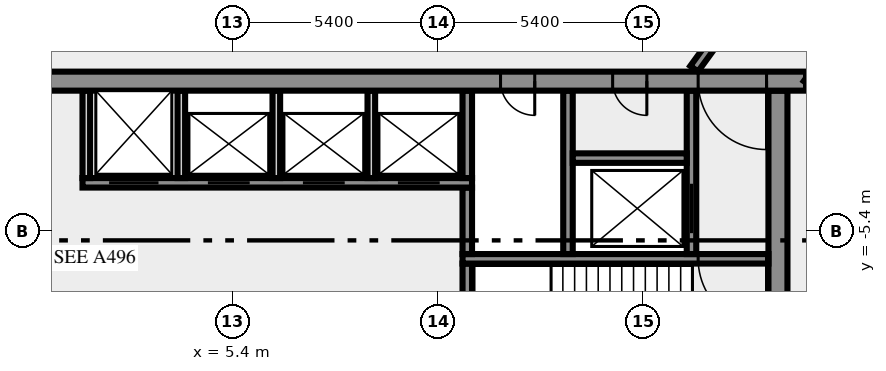
"""IFC4 building model, lengths in metres.
Left out: names, types, materials, properties, quantities, classifications, styles, units other than length and angle.
Written with IfcOpenShell. Run it as: python <this file> out.ifc"""

import sys

from ifc_helpers import new_model, si_unit, direction, frame, frame_2d, origin, place, context, subcontext, project, spatial, rectangle, extrude, element, fill, save


model = new_model("IFC4")
c1 = context("Model", 3, precision=1e-05, world=origin(), true_north=direction((0.0, 1.0)))
c2 = subcontext(c1, "Body", "Model", "MODEL_VIEW")
j1 = project(units=[si_unit("LENGTHUNIT", "METRE"), si_unit("PLANEANGLEUNIT", "RADIAN")], contexts=[c1])
p1 = place(None, origin())
s1 = spatial("IfcSite", under=j1, at=p1, CompositionType="ELEMENT")
p2 = place(p1, origin())
s2 = spatial("IfcBuilding", under=s1, at=p2, CompositionType="ELEMENT")
p3 = place(p2, frame((0.0, 0.0, 218.0)))
s3 = spatial("IfcBuildingStorey", under=s2, at=p3, CompositionType="ELEMENT", Elevation=218.0)
p4 = place(p3, frame((19.75, -10.5, 0.0), z_axis=(0.0, 0.0, 1.0), x_axis=(0.0, 1.0, 0.0)))
e1 = element("IfcWall", 1, at=p4, inside=s3, PredefinedType="SHEAR", context=c2, shape_type="SweptSolid", body=[
    extrude(rectangle(XDim=8.8, YDim=0.5, at=frame_2d((4.4, 0.0))), origin(), (0.0, 0.0, 1.0), 3.65),
])
p5 = place(p3, frame((11.575, -7.25, 0.0), z_axis=(0.0, 0.0, 1.0), x_axis=(0.0, 1.0, 0.0)))
e2 = element("IfcWall", 2, at=p5, inside=s3, PredefinedType="SHEAR", context=c2, shape_type="SweptSolid", body=[
    extrude(rectangle(XDim=1.0, YDim=0.25, at=frame_2d((0.5, 0.0))), origin(), (0.0, 0.0, 1.0), 3.65),
])
p6 = place(p3, frame((19.5, -6.125, 0.0), z_axis=(0.0, 0.0, 1.0), x_axis=(-1.0, 0.0, 0.0)))
e3 = element("IfcWall", 3, at=p6, inside=s3, PredefinedType="SHEAR", context=c2, shape_type="SweptSolid", body=[
    extrude(rectangle(XDim=8.05, YDim=0.25, at=frame_2d((4.025, 0.0))), origin(), (0.0, 0.0, 1.0), 3.65),
])
p7 = place(p6, frame((0.05, 0.0, 0.0)))
e4 = element("IfcOpeningElement", 4, at=p7, cuts=e3, PredefinedType="OPENING", context=c2, shape_type="SweptSolid", body=[
    extrude(rectangle(XDim=1.8, YDim=2.1, at=frame_2d((0.9, 1.05))), frame((0.0, 0.135, 0.0), z_axis=(0.0, -1.0, 0.0), x_axis=(1.0, 0.0, 0.0)), (0.0, 0.0, 1.0), 0.27),
])
p8 = place(p3, frame((11.575, -6.0, 0.0), z_axis=(0.0, 0.0, 1.0), x_axis=(0.0, 1.0, 0.0)))
e5 = element("IfcWall", 5, at=p8, inside=s3, PredefinedType="SHEAR", context=c2, shape_type="SweptSolid", body=[
    extrude(rectangle(XDim=1.75, YDim=0.25, at=frame_2d((0.875, 0.0))), origin(), (0.0, 0.0, 1.0), 3.65),
])
p9 = place(p3, frame((14.225, -6.0, 0.0), z_axis=(0.0, 0.0, 1.0), x_axis=(0.0, 1.0, 0.0)))
e6 = element("IfcWall", 6, at=p9, inside=s3, PredefinedType="SHEAR", context=c2, shape_type="SweptSolid", body=[
    extrude(rectangle(XDim=4.3, YDim=0.25, at=frame_2d((2.15, 0.0))), origin(), (0.0, 0.0, 1.0), 3.65),
])
p10 = place(p3, frame((17.475, -6.0, 0.0), z_axis=(0.0, 0.0, 1.0), x_axis=(0.0, 1.0, 0.0)))
e7 = element("IfcWall", 7, at=p10, inside=s3, PredefinedType="SHEAR", context=c2, shape_type="SweptSolid", body=[
    extrude(rectangle(XDim=4.3, YDim=0.25, at=frame_2d((2.15, 0.0))), origin(), (0.0, 0.0, 1.0), 3.65),
])
p11 = place(p10, frame((0.55, 0.0, 0.0)))
e8 = element("IfcOpeningElement", 8, at=p11, cuts=e7, PredefinedType="OPENING", context=c2, shape_type="SweptSolid", body=[
    extrude(rectangle(XDim=1.3, YDim=2.1, at=frame_2d((0.65, 1.05))), frame((0.0, 0.135, 0.0), z_axis=(0.0, -1.0, 0.0), x_axis=(1.0, 0.0, 0.0)), (0.0, 0.0, 1.0), 0.27),
])
p12 = place(p3, frame((1.45, -4.125, 0.0), z_axis=(0.0, 0.0, 1.0), x_axis=(1.0, 0.0, 0.0)))
e9 = element("IfcWall", 9, at=p12, inside=s3, PredefinedType="SHEAR", context=c2, shape_type="SweptSolid", body=[
    extrude(rectangle(XDim=10.25, YDim=0.25, at=frame_2d((5.125, 0.0))), origin(), (0.0, 0.0, 1.0), 3.65),
])
p13 = place(p12, frame((0.7, 0.0, 0.0)))
e10 = element("IfcOpeningElement", 10, at=p13, cuts=e9, PredefinedType="OPENING", context=c2, shape_type="SweptSolid", body=[
    extrude(rectangle(XDim=1.3, YDim=2.1, at=frame_2d((0.65, 1.05))), frame((0.0, 0.135, 0.0), z_axis=(0.0, -1.0, 0.0), x_axis=(1.0, 0.0, 0.0)), (0.0, 0.0, 1.0), 0.27),
])
p14 = place(p12, frame((3.3, 0.0, 0.0)))
e11 = element("IfcOpeningElement", 11, at=p14, cuts=e9, PredefinedType="OPENING", context=c2, shape_type="SweptSolid", body=[
    extrude(rectangle(XDim=1.1, YDim=2.1, at=frame_2d((0.55, 1.05))), frame((0.0, 0.135, 0.0), z_axis=(0.0, -1.0, 0.0), x_axis=(1.0, 0.0, 0.0)), (0.0, 0.0, 1.0), 0.27),
])
p15 = place(p12, frame((5.8, 0.0, 0.0)))
e12 = element("IfcOpeningElement", 12, at=p15, cuts=e9, PredefinedType="OPENING", context=c2, shape_type="SweptSolid", body=[
    extrude(rectangle(XDim=1.1, YDim=2.1, at=frame_2d((0.55, 1.05))), frame((0.0, 0.135, 0.0), z_axis=(0.0, -1.0, 0.0), x_axis=(1.0, 0.0, 0.0)), (0.0, 0.0, 1.0), 0.27),
])
p16 = place(p12, frame((8.3, 0.0, 0.0)))
e13 = element("IfcOpeningElement", 13, at=p16, cuts=e9, PredefinedType="OPENING", context=c2, shape_type="SweptSolid", body=[
    extrude(rectangle(XDim=1.1, YDim=2.1, at=frame_2d((0.55, 1.05))), frame((0.0, 0.135, 0.0), z_axis=(0.0, -1.0, 0.0), x_axis=(1.0, 0.0, 0.0)), (0.0, 0.0, 1.0), 0.27),
])
for number, where, z_axis, x_axis in (
    (14, (1.55, -4.0, 0.0), (0.0, 0.0, 1.0), (0.0, 1.0, 0.0)),
    (15, (4.05, -4.0, 0.0), (0.0, 0.0, 1.0), (0.0, 1.0, 0.0)),
    (16, (6.55, -4.0, 0.0), (0.0, 0.0, 1.0), (0.0, 1.0, 0.0)),
    (17, (9.05, -4.0, 0.0), (0.0, 0.0, 1.0), (0.0, 1.0, 0.0)),
):
    element("IfcWall", number, at=place(p3, frame(where, z_axis=z_axis, x_axis=x_axis)), inside=s3, PredefinedType="SOLIDWALL", context=c2, shape_type="SweptSolid", body=[
        extrude(rectangle(XDim=2.3, YDim=0.2, at=frame_2d((1.15, 0.0))), origin(), (0.0, 0.0, 1.0), 3.65),
    ])
p17 = place(p3, frame((11.575, -4.0, 0.0), z_axis=(0.0, 0.0, 1.0), x_axis=(0.0, 1.0, 0.0)))
e18 = element("IfcWall", 18, at=p17, inside=s3, PredefinedType="SHEAR", context=c2, shape_type="SweptSolid", body=[
    extrude(rectangle(XDim=2.3, YDim=0.25, at=frame_2d((1.15, 0.0))), origin(), (0.0, 0.0, 1.0), 3.65),
])
p18 = place(p3, frame((14.35, -3.475, 0.0), z_axis=(0.0, 0.0, 1.0), x_axis=(1.0, 0.0, 0.0)))
e19 = element("IfcWall", 19, at=p18, inside=s3, PredefinedType="SHEAR", context=c2, shape_type="SweptSolid", body=[
    extrude(rectangle(XDim=3.0, YDim=0.25, at=frame_2d((1.5, 0.0))), origin(), (0.0, 0.0, 1.0), 3.65),
])
p19 = place(p3, frame((20.49, -1.45, 0.0), z_axis=(0.0, 0.0, 1.0), x_axis=(-1.0, 0.0, 0.0)))
e20 = element("IfcWall", 20, at=p19, inside=s3, PredefinedType="SHEAR", context=c2, shape_type="SweptSolid", body=[
    extrude(rectangle(XDim=40.98, YDim=0.5, at=frame_2d((20.49, 0.0))), origin(), (0.0, 0.0, 1.0), 3.65),
])
p20 = place(p19, frame((38.14, 0.0, 0.0)))
e21 = element("IfcOpeningElement", 21, at=p20, cuts=e20, PredefinedType="OPENING", context=c2, shape_type="SweptSolid", body=[
    extrude(rectangle(XDim=1.8, YDim=2.1, at=frame_2d((0.9, 1.05))), frame((0.0, 0.26, 0.0), z_axis=(0.0, -1.0, 0.0), x_axis=(1.0, 0.0, 0.0)), (0.0, 0.0, 1.0), 0.52),
])
p21 = place(p19, frame((36.728, 0.0, 0.0)))
e22 = element("IfcOpeningElement", 22, at=p21, cuts=e20, PredefinedType="OPENING", context=c2, shape_type="SweptSolid", body=[
    extrude(rectangle(XDim=0.8, YDim=2.1, at=frame_2d((0.4, 1.05))), frame((0.0, 0.26, 0.0), z_axis=(0.0, -1.0, 0.0), x_axis=(1.0, 0.0, 0.0)), (0.0, 0.0, 1.0), 0.52),
])
p22 = place(p19, frame((35.153, 0.0, 0.0)))
e23 = element("IfcOpeningElement", 23, at=p22, cuts=e20, PredefinedType="OPENING", context=c2, shape_type="SweptSolid", body=[
    extrude(rectangle(XDim=0.8, YDim=2.1, at=frame_2d((0.4, 1.05))), frame((0.0, 0.26, 0.0), z_axis=(0.0, -1.0, 0.0), x_axis=(1.0, 0.0, 0.0)), (0.0, 0.0, 1.0), 0.52),
])
p23 = place(p19, frame((32.94, 0.0, 0.0)))
e24 = element("IfcOpeningElement", 24, at=p23, cuts=e20, PredefinedType="OPENING", context=c2, shape_type="SweptSolid", body=[
    extrude(rectangle(XDim=0.9, YDim=2.1, at=frame_2d((0.45, 1.05))), frame((0.0, 0.26, 0.0), z_axis=(0.0, -1.0, 0.0), x_axis=(1.0, 0.0, 0.0)), (0.0, 0.0, 1.0), 0.52),
])
p24 = place(p19, frame((30.202, 0.0, 0.0)))
e25 = element("IfcOpeningElement", 25, at=p24, cuts=e20, PredefinedType="OPENING", context=c2, shape_type="SweptSolid", body=[
    extrude(rectangle(XDim=0.9, YDim=2.1, at=frame_2d((0.45, 1.05))), frame((0.0, 0.26, 0.0), z_axis=(0.0, -1.0, 0.0), x_axis=(1.0, 0.0, 0.0)), (0.0, 0.0, 1.0), 0.52),
])
p25 = place(p19, frame((27.74, 0.0, 0.0)))
e26 = element("IfcOpeningElement", 26, at=p25, cuts=e20, PredefinedType="OPENING", context=c2, shape_type="SweptSolid", body=[
    extrude(rectangle(XDim=0.9, YDim=2.1, at=frame_2d((0.45, 1.05))), frame((0.0, 0.26, 0.0), z_axis=(0.0, -1.0, 0.0), x_axis=(1.0, 0.0, 0.0)), (0.0, 0.0, 1.0), 0.52),
])
p26 = place(p19, frame((25.377, 0.0, 0.0)))
e27 = element("IfcOpeningElement", 27, at=p26, cuts=e20, PredefinedType="OPENING", context=c2, shape_type="SweptSolid", body=[
    extrude(rectangle(XDim=0.9, YDim=2.1, at=frame_2d((0.45, 1.05))), frame((0.0, 0.26, 0.0), z_axis=(0.0, -1.0, 0.0), x_axis=(1.0, 0.0, 0.0)), (0.0, 0.0, 1.0), 0.52),
])
p27 = place(p19, frame((20.74, 0.0, 0.0)))
e28 = element("IfcOpeningElement", 28, at=p27, cuts=e20, PredefinedType="OPENING", context=c2, shape_type="SweptSolid", body=[
    extrude(rectangle(XDim=2.0, YDim=2.1, at=frame_2d((1.0, 1.05))), frame((0.0, 0.26, 0.0), z_axis=(0.0, -1.0, 0.0), x_axis=(1.0, 0.0, 0.0)), (0.0, 0.0, 1.0), 0.52),
])
p28 = place(p19, frame((7.14, 0.0, 0.0)))
e29 = element("IfcOpeningElement", 29, at=p28, cuts=e20, PredefinedType="OPENING", context=c2, shape_type="SweptSolid", body=[
    extrude(rectangle(XDim=0.9, YDim=2.1, at=frame_2d((0.45, 1.05))), frame((0.0, 0.26, 0.0), z_axis=(0.0, -1.0, 0.0), x_axis=(1.0, 0.0, 0.0)), (0.0, 0.0, 1.0), 0.52),
])
p29 = place(p19, frame((4.19, 0.0, 0.0)))
e30 = element("IfcOpeningElement", 30, at=p29, cuts=e20, PredefinedType="OPENING", context=c2, shape_type="SweptSolid", body=[
    extrude(rectangle(XDim=0.9, YDim=2.1, at=frame_2d((0.45, 1.05))), frame((0.0, 0.26, 0.0), z_axis=(0.0, -1.0, 0.0), x_axis=(1.0, 0.0, 0.0)), (0.0, 0.0, 1.0), 0.52),
])
p30 = place(p19, frame((1.04, 0.0, 0.0)))
e31 = element("IfcOpeningElement", 31, at=p30, cuts=e20, PredefinedType="OPENING", context=c2, shape_type="SweptSolid", body=[
    extrude(rectangle(XDim=1.8, YDim=2.1, at=frame_2d((0.9, 1.05))), frame((0.0, 0.26, 0.0), z_axis=(0.0, -1.0, 0.0), x_axis=(1.0, 0.0, 0.0)), (0.0, 0.0, 1.0), 0.52),
])
p31 = place(p3, frame((17.545, -1.125, 0.0), z_axis=(0.0, 0.0, 1.0), x_axis=(0.587787966774, 0.809015022181, 0.0)))
e32 = element("IfcWall", 32, at=p31, inside=s3, PredefinedType="SOLIDWALL", context=c2, shape_type="SweptSolid", body=[
    extrude(rectangle(XDim=23.345, YDim=0.25, at=frame_2d((11.672, 0.0))), origin(), (0.0, 0.0, 1.0), 3.65),
])
p32 = place(p31, frame((3.441, 0.0, 0.0)))
e33 = element("IfcOpeningElement", 33, at=p32, cuts=e32, PredefinedType="OPENING", context=c2, shape_type="SweptSolid", body=[
    extrude(rectangle(XDim=0.9, YDim=2.1, at=frame_2d((0.45, 1.05))), frame((0.0, 0.135, 0.0), z_axis=(0.0, -1.0, 0.0), x_axis=(1.0, 0.0, 0.0)), (0.0, 0.0, 1.0), 0.27),
])
p33 = place(p3, frame((33.41, 16.203, 0.0), z_axis=(0.0, 0.0, 1.0), x_axis=(-0.587786711753, -0.809015934013, 0.0)))
e34 = element("IfcWall", 34, at=p33, inside=s3, PredefinedType="SOLIDWALL", context=c2, shape_type="SweptSolid", body=[
    extrude(rectangle(XDim=21.911, YDim=0.25, at=frame_2d((10.956, 0.0))), origin(), (0.0, 0.0, 1.0), 3.65),
])
p34 = place(p33, frame((20.479, 0.0, 0.0)))
e35 = element("IfcOpeningElement", 35, at=p34, cuts=e34, PredefinedType="OPENING", context=c2, shape_type="SweptSolid", body=[
    extrude(rectangle(XDim=0.9, YDim=2.1, at=frame_2d((0.45, 1.05))), frame((0.0, 0.135, 0.0), z_axis=(0.0, -1.0, 0.0), x_axis=(1.0, 0.0, 0.0)), (0.0, 0.0, 1.0), 0.27),
])
p35 = place(p7, origin())
e36 = element("IfcDoor", 36, at=p35, inside=s3, OperationType="DOUBLE_DOOR_SINGLE_SWING", PredefinedType="DOOR", context=c2, shape_type="SweptSolid", body=[
    extrude(rectangle(XDim=1.8, YDim=2.1, at=frame_2d((0.9, 1.05))), frame((0.0, 0.025, 0.0), z_axis=(0.0, -1.0, 0.0), x_axis=(1.0, 0.0, 0.0)), (0.0, 0.0, 1.0), 0.05),
])
fill(e4, e36)
p36 = place(p11, origin())
e37 = element("IfcDoor", 37, at=p36, inside=s3, OperationType="DOUBLE_DOOR_SLIDING", PredefinedType="DOOR", context=c2, shape_type="SweptSolid", body=[
    extrude(rectangle(XDim=1.3, YDim=2.1, at=frame_2d((0.65, 1.05))), frame((0.0, 0.025, 0.0), z_axis=(0.0, -1.0, 0.0), x_axis=(1.0, 0.0, 0.0)), (0.0, 0.0, 1.0), 0.05),
])
fill(e8, e37)
p37 = place(p13, origin())
e38 = element("IfcDoor", 38, at=p37, inside=s3, OperationType="DOUBLE_DOOR_SLIDING", PredefinedType="DOOR", context=c2, shape_type="SweptSolid", body=[
    extrude(rectangle(XDim=1.3, YDim=2.1, at=frame_2d((0.65, 1.05))), frame((0.0, 0.025, 0.0), z_axis=(0.0, -1.0, 0.0), x_axis=(1.0, 0.0, 0.0)), (0.0, 0.0, 1.0), 0.05),
])
fill(e10, e38)
p38 = place(p14, origin())
e39 = element("IfcDoor", 39, at=p38, inside=s3, OperationType="DOUBLE_DOOR_SLIDING", PredefinedType="DOOR", context=c2, shape_type="SweptSolid", body=[
    extrude(rectangle(XDim=1.1, YDim=2.1, at=frame_2d((0.55, 1.05))), frame((0.0, 0.025, 0.0), z_axis=(0.0, -1.0, 0.0), x_axis=(1.0, 0.0, 0.0)), (0.0, 0.0, 1.0), 0.05),
])
fill(e11, e39)
p39 = place(p15, origin())
e40 = element("IfcDoor", 40, at=p39, inside=s3, OperationType="DOUBLE_DOOR_SLIDING", PredefinedType="DOOR", context=c2, shape_type="SweptSolid", body=[
    extrude(rectangle(XDim=1.1, YDim=2.1, at=frame_2d((0.55, 1.05))), frame((0.0, 0.025, 0.0), z_axis=(0.0, -1.0, 0.0), x_axis=(1.0, 0.0, 0.0)), (0.0, 0.0, 1.0), 0.05),
])
fill(e12, e40)
p40 = place(p16, origin())
e41 = element("IfcDoor", 41, at=p40, inside=s3, OperationType="DOUBLE_DOOR_SLIDING", PredefinedType="DOOR", context=c2, shape_type="SweptSolid", body=[
    extrude(rectangle(XDim=1.1, YDim=2.1, at=frame_2d((0.55, 1.05))), frame((0.0, 0.025, 0.0), z_axis=(0.0, -1.0, 0.0), x_axis=(1.0, 0.0, 0.0)), (0.0, 0.0, 1.0), 0.05),
])
fill(e13, e41)
p41 = place(p28, origin())
e42 = element("IfcDoor", 42, at=p41, inside=s3, OperationType="SINGLE_SWING_LEFT", PredefinedType="DOOR", context=c2, shape_type="SweptSolid", body=[
    extrude(rectangle(XDim=0.9, YDim=2.1, at=frame_2d((0.45, 1.05))), frame((0.0, 0.025, 0.0), z_axis=(0.0, -1.0, 0.0), x_axis=(1.0, 0.0, 0.0)), (0.0, 0.0, 1.0), 0.05),
])
fill(e29, e42)
p42 = place(p29, origin())
e43 = element("IfcDoor", 43, at=p42, inside=s3, OperationType="SINGLE_SWING_LEFT", PredefinedType="DOOR", context=c2, shape_type="SweptSolid", body=[
    extrude(rectangle(XDim=0.9, YDim=2.1, at=frame_2d((0.45, 1.05))), frame((0.0, 0.025, 0.0), z_axis=(0.0, -1.0, 0.0), x_axis=(1.0, 0.0, 0.0)), (0.0, 0.0, 1.0), 0.05),
])
fill(e30, e43)
p43 = place(p30, origin())
e44 = element("IfcDoor", 44, at=p43, inside=s3, OperationType="DOUBLE_DOOR_SINGLE_SWING", PredefinedType="DOOR", context=c2, shape_type="SweptSolid", body=[
    extrude(rectangle(XDim=1.8, YDim=2.1, at=frame_2d((0.9, 1.05))), frame((0.0, 0.025, 0.0), z_axis=(0.0, -1.0, 0.0), x_axis=(1.0, 0.0, 0.0)), (0.0, 0.0, 1.0), 0.05),
])
fill(e31, e44)
save(model, sys.argv[1])
